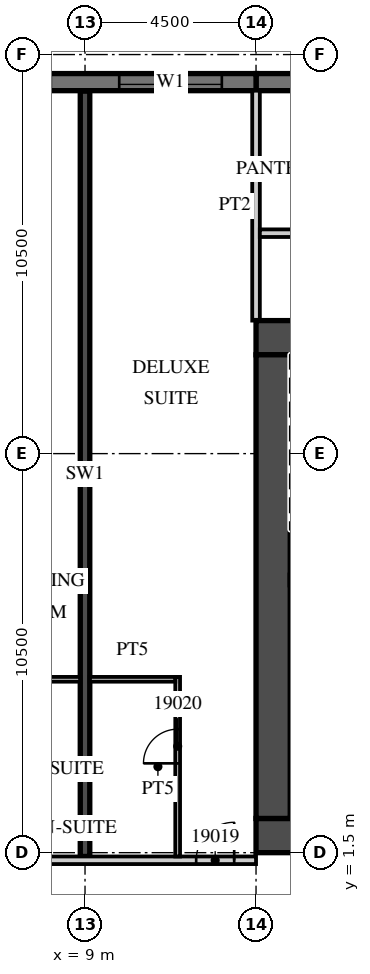
"""IFC4 building model, lengths in metres.
Left out: names, types, materials, properties, quantities, classifications, styles, units other than length and angle.
Written with IfcOpenShell. Run it as: python <this file> out.ifc"""

import sys

from ifc_helpers import new_model, si_unit, direction, frame, frame_2d, origin, place, context, subcontext, project, spatial, rectangle, extrude, element, fill, save


model = new_model("IFC4")
c1 = context("Model", 3, precision=1e-05, world=origin(), true_north=direction((0.0, 1.0)))
c2 = subcontext(c1, "Body", "Model", "MODEL_VIEW")
j1 = project(units=[si_unit("LENGTHUNIT", "METRE"), si_unit("PLANEANGLEUNIT", "RADIAN")], contexts=[c1])
p1 = place(None, origin())
s1 = spatial("IfcSite", under=j1, at=p1, CompositionType="ELEMENT")
p2 = place(p1, origin())
s2 = spatial("IfcBuilding", under=s1, at=p2, CompositionType="ELEMENT")
p3 = place(p2, frame((0.0, 0.0, 93.0)))
s3 = spatial("IfcBuildingStorey", under=s2, at=p3, CompositionType="ELEMENT", Elevation=93.0)
p4 = place(p3, frame((9.0, 1.4, 0.0), z_axis=(0.0, 0.0, 1.0), x_axis=(0.0, 1.0, 0.0)))
e1 = element("IfcWall", 1, at=p4, inside=s3, PredefinedType="SHEAR", context=c2, shape_type="SweptSolid", body=[
    extrude(rectangle(XDim=20.14, YDim=0.25, at=frame_2d((10.07, 0.0))), origin(), (0.0, 0.0, 1.0), 3.3),
])
p5 = place(p3, frame((31.5, 21.775, 0.0), z_axis=(0.0, 0.0, 1.0), x_axis=(-1.0, 0.0, 0.0)))
e2 = element("IfcWall", 2, at=p5, inside=s3, PredefinedType="SOLIDWALL", context=c2, shape_type="SweptSolid", body=[
    extrude(rectangle(XDim=18.0, YDim=0.45, at=frame_2d((9.0, 0.0))), origin(), (0.0, 0.0, 1.0), 3.02),
])
p6 = place(p3, frame((13.5, 21.775, 0.0), z_axis=(0.0, 0.0, 1.0), x_axis=(-1.0, 0.0, 0.0)))
e3 = element("IfcWall", 3, at=p6, inside=s3, PredefinedType="SOLIDWALL", context=c2, shape_type="SweptSolid", body=[
    extrude(rectangle(XDim=54.5, YDim=0.45, at=frame_2d((27.25, 0.0))), origin(), (0.0, 0.0, 1.0), 3.02),
])
p7 = place(p6, frame((0.9, 0.0, 0.45)))
e4 = element("IfcOpeningElement", 4, at=p7, cuts=e3, PredefinedType="OPENING", context=c2, shape_type="SweptSolid", body=[
    extrude(rectangle(XDim=2.7, YDim=2.25, at=frame_2d((1.35, 1.125))), frame((0.0, 0.235, 0.0), z_axis=(0.0, -1.0, 0.0), x_axis=(1.0, 0.0, 0.0)), (0.0, 0.0, 1.0), 0.47),
])
p8 = place(p6, frame((5.4, 0.0, 0.45)))
e5 = element("IfcOpeningElement", 5, at=p8, cuts=e3, PredefinedType="OPENING", context=c2, shape_type="SweptSolid", body=[
    extrude(rectangle(XDim=2.7, YDim=2.25, at=frame_2d((1.35, 1.125))), frame((0.0, 0.235, 0.0), z_axis=(0.0, -1.0, 0.0), x_axis=(1.0, 0.0, 0.0)), (0.0, 0.0, 1.0), 0.47),
])
p9 = place(p6, frame((9.9, 0.0, 0.45)))
e6 = element("IfcOpeningElement", 6, at=p9, cuts=e3, PredefinedType="OPENING", context=c2, shape_type="SweptSolid", body=[
    extrude(rectangle(XDim=2.7, YDim=2.25, at=frame_2d((1.35, 1.125))), frame((0.0, 0.235, 0.0), z_axis=(0.0, -1.0, 0.0), x_axis=(1.0, 0.0, 0.0)), (0.0, 0.0, 1.0), 0.47),
])
p10 = place(p6, frame((14.4, 0.0, 0.45)))
e7 = element("IfcOpeningElement", 7, at=p10, cuts=e3, PredefinedType="OPENING", context=c2, shape_type="SweptSolid", body=[
    extrude(rectangle(XDim=2.7, YDim=2.25, at=frame_2d((1.35, 1.125))), frame((0.0, 0.235, 0.0), z_axis=(0.0, -1.0, 0.0), x_axis=(1.0, 0.0, 0.0)), (0.0, 0.0, 1.0), 0.47),
])
p11 = place(p6, frame((18.9, 0.0, 0.45)))
e8 = element("IfcOpeningElement", 8, at=p11, cuts=e3, PredefinedType="OPENING", context=c2, shape_type="SweptSolid", body=[
    extrude(rectangle(XDim=2.7, YDim=2.25, at=frame_2d((1.35, 1.125))), frame((0.0, 0.235, 0.0), z_axis=(0.0, -1.0, 0.0), x_axis=(1.0, 0.0, 0.0)), (0.0, 0.0, 1.0), 0.47),
])
p12 = place(p6, frame((23.4, 0.0, 0.45)))
e9 = element("IfcOpeningElement", 9, at=p12, cuts=e3, PredefinedType="OPENING", context=c2, shape_type="SweptSolid", body=[
    extrude(rectangle(XDim=2.7, YDim=2.25, at=frame_2d((1.35, 1.125))), frame((0.0, 0.235, 0.0), z_axis=(0.0, -1.0, 0.0), x_axis=(1.0, 0.0, 0.0)), (0.0, 0.0, 1.0), 0.47),
])
p13 = place(p6, frame((27.9, 0.0, 0.45)))
e10 = element("IfcOpeningElement", 10, at=p13, cuts=e3, PredefinedType="OPENING", context=c2, shape_type="SweptSolid", body=[
    extrude(rectangle(XDim=2.7, YDim=2.25, at=frame_2d((1.35, 1.125))), frame((0.0, 0.235, 0.0), z_axis=(0.0, -1.0, 0.0), x_axis=(1.0, 0.0, 0.0)), (0.0, 0.0, 1.0), 0.47),
])
p14 = place(p6, frame((32.4, 0.0, 0.45)))
e11 = element("IfcOpeningElement", 11, at=p14, cuts=e3, PredefinedType="OPENING", context=c2, shape_type="SweptSolid", body=[
    extrude(rectangle(XDim=2.7, YDim=2.25, at=frame_2d((1.35, 1.125))), frame((0.0, 0.235, 0.0), z_axis=(0.0, -1.0, 0.0), x_axis=(1.0, 0.0, 0.0)), (0.0, 0.0, 1.0), 0.47),
])
p15 = place(p6, frame((36.9, 0.0, 0.45)))
e12 = element("IfcOpeningElement", 12, at=p15, cuts=e3, PredefinedType="OPENING", context=c2, shape_type="SweptSolid", body=[
    extrude(rectangle(XDim=2.7, YDim=2.25, at=frame_2d((1.35, 1.125))), frame((0.0, 0.235, 0.0), z_axis=(0.0, -1.0, 0.0), x_axis=(1.0, 0.0, 0.0)), (0.0, 0.0, 1.0), 0.47),
])
p16 = place(p6, frame((41.4, 0.0, 0.45)))
e13 = element("IfcOpeningElement", 13, at=p16, cuts=e3, PredefinedType="OPENING", context=c2, shape_type="SweptSolid", body=[
    extrude(rectangle(XDim=2.7, YDim=2.25, at=frame_2d((1.35, 1.125))), frame((0.0, 0.235, 0.0), z_axis=(0.0, -1.0, 0.0), x_axis=(1.0, 0.0, 0.0)), (0.0, 0.0, 1.0), 0.47),
])
p17 = place(p6, frame((45.9, 0.0, 0.45)))
e14 = element("IfcOpeningElement", 14, at=p17, cuts=e3, PredefinedType="OPENING", context=c2, shape_type="SweptSolid", body=[
    extrude(rectangle(XDim=2.7, YDim=2.25, at=frame_2d((1.35, 1.125))), frame((0.0, 0.235, 0.0), z_axis=(0.0, -1.0, 0.0), x_axis=(1.0, 0.0, 0.0)), (0.0, 0.0, 1.0), 0.47),
])
p18 = place(p6, frame((50.4, 0.0, 0.45)))
e15 = element("IfcOpeningElement", 15, at=p18, cuts=e3, PredefinedType="OPENING", context=c2, shape_type="SweptSolid", body=[
    extrude(rectangle(XDim=2.7, YDim=2.25, at=frame_2d((1.35, 1.125))), frame((0.0, 0.235, 0.0), z_axis=(0.0, -1.0, 0.0), x_axis=(1.0, 0.0, 0.0)), (0.0, 0.0, 1.0), 0.47),
])
p19 = place(p3, frame((13.5, 15.5, 0.0), z_axis=(0.0, 0.0, 1.0), x_axis=(0.0, 1.0, 0.0)))
e16 = element("IfcWall", 16, at=p19, inside=s3, PredefinedType="PARTITIONING", context=c2, shape_type="SweptSolid", body=[
    extrude(rectangle(XDim=6.05, YDim=0.2, at=frame_2d((3.025, 0.0))), origin(), (0.0, 0.0, 1.0), 3.02),
])
p20 = place(p3, frame((-44.55, 1.3, 0.0), z_axis=(0.0, 0.0, 1.0), x_axis=(1.0, 0.0, 0.0)))
e17 = element("IfcWall", 17, at=p20, inside=s3, PredefinedType="PARTITIONING", context=c2, shape_type="SweptSolid", body=[
    extrude(rectangle(XDim=58.05, YDim=0.2, at=frame_2d((29.025, 0.0))), origin(), (0.0, 0.0, 1.0), 3.02),
])
p21 = place(p20, frame((0.525, 0.0, 0.0)))
e18 = element("IfcOpeningElement", 18, at=p21, cuts=e17, PredefinedType="OPENING", context=c2, shape_type="SweptSolid", body=[
    extrude(rectangle(XDim=1.0, YDim=2.1, at=frame_2d((0.5, 1.05))), frame((0.0, 0.11, 0.0), z_axis=(0.0, -1.0, 0.0), x_axis=(1.0, 0.0, 0.0)), (0.0, 0.0, 1.0), 0.22),
])
p22 = place(p20, frame((4.625, 0.0, 0.0)))
e19 = element("IfcOpeningElement", 19, at=p22, cuts=e17, PredefinedType="OPENING", context=c2, shape_type="SweptSolid", body=[
    extrude(rectangle(XDim=1.0, YDim=2.1, at=frame_2d((0.5, 1.05))), frame((0.0, 0.11, 0.0), z_axis=(0.0, -1.0, 0.0), x_axis=(1.0, 0.0, 0.0)), (0.0, 0.0, 1.0), 0.22),
])
p23 = place(p20, frame((10.987, 0.0, 0.0)))
e20 = element("IfcOpeningElement", 20, at=p23, cuts=e17, PredefinedType="OPENING", context=c2, shape_type="SweptSolid", body=[
    extrude(rectangle(XDim=1.2, YDim=2.1, at=frame_2d((0.6, 1.05))), frame((0.0, 0.11, 0.0), z_axis=(0.0, -1.0, 0.0), x_axis=(1.0, 0.0, 0.0)), (0.0, 0.0, 1.0), 0.22),
])
p24 = place(p20, frame((22.912, 0.0, 0.0)))
e21 = element("IfcOpeningElement", 21, at=p24, cuts=e17, PredefinedType="OPENING", context=c2, shape_type="SweptSolid", body=[
    extrude(rectangle(XDim=1.2, YDim=2.1, at=frame_2d((0.6, 1.05))), frame((0.0, 0.11, 0.0), z_axis=(0.0, -1.0, 0.0), x_axis=(1.0, 0.0, 0.0)), (0.0, 0.0, 1.0), 0.22),
])
p25 = place(p20, frame((28.987, 0.0, 0.0)))
e22 = element("IfcOpeningElement", 22, at=p25, cuts=e17, PredefinedType="OPENING", context=c2, shape_type="SweptSolid", body=[
    extrude(rectangle(XDim=1.2, YDim=2.1, at=frame_2d((0.6, 1.05))), frame((0.0, 0.11, 0.0), z_axis=(0.0, -1.0, 0.0), x_axis=(1.0, 0.0, 0.0)), (0.0, 0.0, 1.0), 0.22),
])
p26 = place(p20, frame((36.125, 0.0, 0.0)))
e23 = element("IfcOpeningElement", 23, at=p26, cuts=e17, PredefinedType="OPENING", context=c2, shape_type="SweptSolid", body=[
    extrude(rectangle(XDim=1.0, YDim=2.1, at=frame_2d((0.5, 1.05))), frame((0.0, 0.11, 0.0), z_axis=(0.0, -1.0, 0.0), x_axis=(1.0, 0.0, 0.0)), (0.0, 0.0, 1.0), 0.22),
])
p27 = place(p20, frame((42.975, 0.0, 0.0)))
e24 = element("IfcOpeningElement", 24, at=p27, cuts=e17, PredefinedType="OPENING", context=c2, shape_type="SweptSolid", body=[
    extrude(rectangle(XDim=1.0, YDim=2.1, at=frame_2d((0.5, 1.05))), frame((0.0, 0.11, 0.0), z_axis=(0.0, -1.0, 0.0), x_axis=(1.0, 0.0, 0.0)), (0.0, 0.0, 1.0), 0.22),
])
p28 = place(p20, frame((47.5, 0.0, 0.0)))
e25 = element("IfcOpeningElement", 25, at=p28, cuts=e17, PredefinedType="OPENING", context=c2, shape_type="SweptSolid", body=[
    extrude(rectangle(XDim=1.0, YDim=2.1, at=frame_2d((0.5, 1.05))), frame((0.0, 0.11, 0.0), z_axis=(0.0, -1.0, 0.0), x_axis=(1.0, 0.0, 0.0)), (0.0, 0.0, 1.0), 0.22),
])
p29 = place(p20, frame((49.6, 0.0, 0.0)))
e26 = element("IfcOpeningElement", 26, at=p29, cuts=e17, PredefinedType="OPENING", context=c2, shape_type="SweptSolid", body=[
    extrude(rectangle(XDim=1.0, YDim=2.1, at=frame_2d((0.5, 1.05))), frame((0.0, 0.11, 0.0), z_axis=(0.0, -1.0, 0.0), x_axis=(1.0, 0.0, 0.0)), (0.0, 0.0, 1.0), 0.22),
])
p30 = place(p20, frame((56.475, 0.0, 0.0)))
e27 = element("IfcOpeningElement", 27, at=p30, cuts=e17, PredefinedType="OPENING", context=c2, shape_type="SweptSolid", body=[
    extrude(rectangle(XDim=1.0, YDim=2.1, at=frame_2d((0.5, 1.05))), frame((0.0, 0.11, 0.0), z_axis=(0.0, -1.0, 0.0), x_axis=(1.0, 0.0, 0.0)), (0.0, 0.0, 1.0), 0.22),
])
p31 = place(p3, frame((6.625, 6.062, 0.0), z_axis=(0.0, 0.0, 1.0), x_axis=(1.0, 0.0, 0.0)))
e28 = element("IfcWall", 28, at=p31, inside=s3, PredefinedType="PARTITIONING", context=c2, shape_type="SweptSolid", body=[
    extrude(rectangle(XDim=2.25, YDim=0.125, at=frame_2d((1.125, 0.0))), origin(), (0.0, 0.0, 1.0), 3.02),
])
p32 = place(p3, frame((11.438, 1.4, 0.0), z_axis=(0.0, 0.0, 1.0), x_axis=(0.0, 1.0, 0.0)))
e29 = element("IfcWall", 29, at=p32, inside=s3, PredefinedType="PARTITIONING", context=c2, shape_type="SweptSolid", body=[
    extrude(rectangle(XDim=4.725, YDim=0.125, at=frame_2d((2.363, 0.0))), origin(), (0.0, 0.0, 1.0), 3.02),
])
p33 = place(p32, frame((2.45, 0.0, 0.0)))
e30 = element("IfcOpeningElement", 30, at=p33, cuts=e29, PredefinedType="OPENING", context=c2, shape_type="SweptSolid", body=[
    extrude(rectangle(XDim=0.9, YDim=2.1, at=frame_2d((0.45, 1.05))), frame((0.0, 0.073, 0.0), z_axis=(0.0, -1.0, 0.0), x_axis=(1.0, 0.0, 0.0)), (0.0, 0.0, 1.0), 0.145),
])
p34 = place(p3, frame((9.125, 6.062, 0.0), z_axis=(0.0, 0.0, 1.0), x_axis=(1.0, 0.0, 0.0)))
e31 = element("IfcWall", 31, at=p34, inside=s3, PredefinedType="PARTITIONING", context=c2, shape_type="SweptSolid", body=[
    extrude(rectangle(XDim=2.25, YDim=0.125, at=frame_2d((1.125, 0.0))), origin(), (0.0, 0.0, 1.0), 3.02),
])
p35 = place(p3, frame((13.5, 1.95, 0.0), z_axis=(0.0, 0.0, 1.0), x_axis=(1.0, 0.0, 0.0)))
e32 = element("IfcWall", 32, at=p35, inside=s3, PredefinedType="SHEAR", context=c2, shape_type="SweptSolid", body=[
    extrude(rectangle(XDim=18.0, YDim=0.9, at=frame_2d((9.0, 0.0))), origin(), (0.0, 0.0, 1.0), 3.02),
])
p36 = place(p35, frame((1.475, 0.0, 0.0)))
e33 = element("IfcOpeningElement", 33, at=p36, cuts=e32, PredefinedType="OPENING", context=c2, shape_type="SweptSolid", body=[
    extrude(rectangle(XDim=1.8, YDim=2.1, at=frame_2d((0.9, 1.05))), frame((0.0, 0.46, 0.0), z_axis=(0.0, -1.0, 0.0), x_axis=(1.0, 0.0, 0.0)), (0.0, 0.0, 1.0), 0.92),
])
p37 = place(p3, frame((13.5, 15.05, 0.0), z_axis=(0.0, 0.0, 1.0), x_axis=(1.0, 0.0, 0.0)))
e34 = element("IfcWall", 34, at=p37, inside=s3, PredefinedType="SHEAR", context=c2, shape_type="SweptSolid", body=[
    extrude(rectangle(XDim=6.8, YDim=0.9, at=frame_2d((3.4, 0.0))), origin(), (0.0, 0.0, 1.0), 3.02),
])
p38 = place(p37, frame((4.725, 0.0, 0.0)))
e35 = element("IfcOpeningElement", 35, at=p38, cuts=e34, PredefinedType="OPENING", context=c2, shape_type="SweptSolid", body=[
    extrude(rectangle(XDim=1.2, YDim=2.1, at=frame_2d((0.6, 1.05))), frame((0.0, 0.46, 0.0), z_axis=(0.0, -1.0, 0.0), x_axis=(1.0, 0.0, 0.0)), (0.0, 0.0, 1.0), 0.92),
])
p39 = place(p3, frame((13.95, 2.4, 0.0), z_axis=(0.0, 0.0, 1.0), x_axis=(0.0, 1.0, 0.0)))
e36 = element("IfcWall", 36, at=p39, inside=s3, PredefinedType="SHEAR", context=c2, shape_type="SweptSolid", body=[
    extrude(rectangle(XDim=12.2, YDim=0.9, at=frame_2d((6.1, 0.0))), origin(), (0.0, 0.0, 1.0), 3.02),
])
p40 = place(p3, frame((13.6, 17.8, 0.0), z_axis=(0.0, 0.0, 1.0), x_axis=(1.0, 0.0, 0.0)))
e37 = element("IfcWall", 37, at=p40, inside=s3, PredefinedType="PARTITIONING", context=c2, shape_type="SweptSolid", body=[
    extrude(rectangle(XDim=30.95, YDim=0.2, at=frame_2d((15.475, 0.0))), origin(), (0.0, 0.0, 1.0), 3.02),
])
p41 = place(p40, frame((15.012, 0.0, 0.0)))
e38 = element("IfcOpeningElement", 38, at=p41, cuts=e37, PredefinedType="OPENING", context=c2, shape_type="SweptSolid", body=[
    extrude(rectangle(XDim=0.9, YDim=2.1, at=frame_2d((0.45, 1.05))), frame((0.0, 0.11, 0.0), z_axis=(0.0, -1.0, 0.0), x_axis=(1.0, 0.0, 0.0)), (0.0, 0.0, 1.0), 0.22),
])
p42 = place(p40, frame((6.712, 0.0, 0.0)))
e39 = element("IfcOpeningElement", 39, at=p42, cuts=e37, PredefinedType="OPENING", context=c2, shape_type="SweptSolid", body=[
    extrude(rectangle(XDim=0.9, YDim=2.1, at=frame_2d((0.45, 1.05))), frame((0.0, 0.11, 0.0), z_axis=(0.0, -1.0, 0.0), x_axis=(1.0, 0.0, 0.0)), (0.0, 0.0, 1.0), 0.22),
])
p43 = place(p7, origin())
e40 = element("IfcWindow", 40, at=p43, inside=s3, PartitioningType="SINGLE_PANEL", PredefinedType="WINDOW", context=c2, shape_type="SweptSolid", body=[
    extrude(rectangle(XDim=2.7, YDim=2.25, at=frame_2d((1.35, 1.125))), frame((0.0, 0.09, 0.0), z_axis=(0.0, -1.0, 0.0), x_axis=(1.0, 0.0, 0.0)), (0.0, 0.0, 1.0), 0.06),
])
fill(e4, e40)
p44 = place(p30, origin())
e41 = element("IfcDoor", 41, at=p44, inside=s3, OperationType="SINGLE_SWING_RIGHT", PredefinedType="DOOR", context=c2, shape_type="SweptSolid", body=[
    extrude(rectangle(XDim=1.0, YDim=2.1, at=frame_2d((0.5, 1.05))), frame((0.0, 0.025, 0.0), z_axis=(0.0, -1.0, 0.0), x_axis=(1.0, 0.0, 0.0)), (0.0, 0.0, 1.0), 0.05),
])
fill(e27, e41)
p45 = place(p33, origin())
e42 = element("IfcDoor", 42, at=p45, inside=s3, OperationType="SINGLE_SWING_LEFT", PredefinedType="DOOR", context=c2, shape_type="SweptSolid", body=[
    extrude(rectangle(XDim=0.9, YDim=2.1, at=frame_2d((0.45, 1.05))), frame((0.0, 0.025, 0.0), z_axis=(0.0, -1.0, 0.0), x_axis=(1.0, 0.0, 0.0)), (0.0, 0.0, 1.0), 0.05),
])
fill(e30, e42)
save(model, sys.argv[1])
